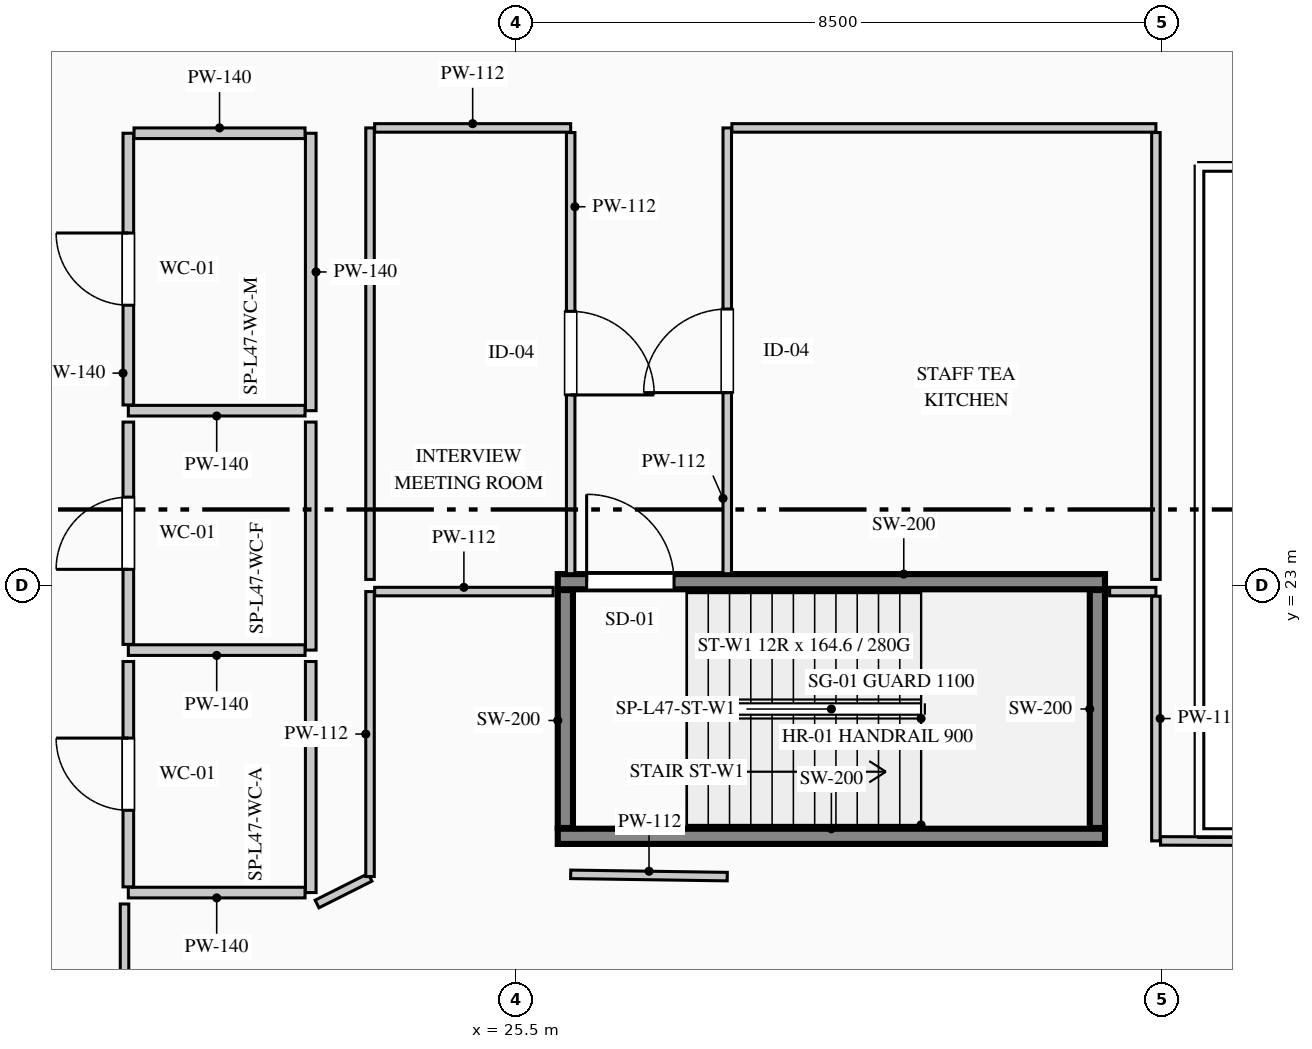
"""IFC4 building model, lengths in metres.
Left out: names, types, materials, properties, quantities, classifications, styles, units other than length and angle.
Written with IfcOpenShell. Run it as: python <this file> out.ifc"""

import sys

from ifc_helpers import new_model, si_unit, direction, frame, frame_2d, origin, place, context, subcontext, project, spatial, rectangle, extrude, element, fill, save


model = new_model("IFC4")
c1 = context("Model", 3, precision=1e-05, world=origin(), true_north=direction((0.0, 1.0)))
c2 = subcontext(c1, "Body", "Model", "MODEL_VIEW")
j1 = project(units=[si_unit("LENGTHUNIT", "METRE"), si_unit("PLANEANGLEUNIT", "RADIAN")], contexts=[c1])
p1 = place(None, origin())
s1 = spatial("IfcSite", under=j1, at=p1, CompositionType="ELEMENT")
p2 = place(p1, origin())
s2 = spatial("IfcBuilding", under=s1, at=p2, CompositionType="ELEMENT")
p3 = place(p2, frame((0.0, 0.0, 199.55)))
s3 = spatial("IfcBuildingStorey", under=s2, at=p3, CompositionType="ELEMENT", Elevation=199.55)
p4 = place(p3, frame((26.05, 19.7, 0.0), z_axis=(0.0, 0.0, 1.0), x_axis=(1.0, 0.0, 0.0)))
e1 = element("IfcWall", 1, at=p4, inside=s3, PredefinedType="SHEAR", context=c2, shape_type="SweptSolid", body=[
    extrude(rectangle(XDim=7.2, YDim=0.2, at=frame_2d((3.6, 0.0))), origin(), (0.0, 0.0, 1.0), 3.95),
])
p5 = place(p3, frame((26.05, 23.05, 0.0), z_axis=(0.0, 0.0, 1.0), x_axis=(1.0, 0.0, 0.0)))
e2 = element("IfcWall", 2, at=p5, inside=s3, PredefinedType="SHEAR", context=c2, shape_type="SweptSolid", body=[
    extrude(rectangle(XDim=7.2, YDim=0.2, at=frame_2d((3.6, 0.0))), origin(), (0.0, 0.0, 1.0), 3.95),
])
p6 = place(p5, frame((0.38, 0.0, 0.0)))
e3 = element("IfcOpeningElement", 3, at=p6, cuts=e2, PredefinedType="OPENING", context=c2, shape_type="SweptSolid", body=[
    extrude(rectangle(XDim=1.15, YDim=2.2, at=frame_2d((0.575, 1.1))), frame((0.0, 0.11, 0.0), z_axis=(0.0, -1.0, 0.0), x_axis=(1.0, 0.0, 0.0)), (0.0, 0.0, 1.0), 0.22),
])
for number, where, z_axis, x_axis in (
    (4, (26.15, 19.81, 0.0), (0.0, 0.0, 1.0), (0.0, 1.0, 0.0)),
    (5, (33.15, 19.81, 0.0), (0.0, 0.0, 1.0), (0.0, 1.0, 0.0)),
):
    element("IfcWall", number, at=place(p3, frame(where, z_axis=z_axis, x_axis=x_axis)), inside=s3, PredefinedType="SHEAR", context=c2, shape_type="SweptSolid", body=[
        extrude(rectangle(XDim=3.13, YDim=0.2, at=frame_2d((1.565, 0.0))), origin(), (0.0, 0.0, 1.0), 3.95),
    ])
p7 = place(p3, frame((22.8, 28.95, 0.0), z_axis=(0.0, 0.0, 1.0), x_axis=(0.0, -1.0, 0.0)))
e6 = element("IfcWall", 6, at=p7, inside=s3, PredefinedType="PARTITIONING", context=c2, shape_type="SweptSolid", body=[
    extrude(rectangle(XDim=3.65, YDim=0.14, at=frame_2d((1.825, 0.0))), origin(), (0.0, 0.0, 1.0), 3.285),
])
p8 = place(p3, frame((22.725, 25.3, 0.0), z_axis=(0.0, 0.0, 1.0), x_axis=(-1.0, 0.0, 0.0)))
e7 = element("IfcWall", 7, at=p8, inside=s3, PredefinedType="PARTITIONING", context=c2, shape_type="SweptSolid", body=[
    extrude(rectangle(XDim=2.325, YDim=0.14, at=frame_2d((1.163, 0.0))), origin(), (0.0, 0.0, 1.0), 3.7),
])
p9 = place(p3, frame((20.4, 25.375, 0.0), z_axis=(0.0, 0.0, 1.0), x_axis=(0.0, 1.0, 0.0)))
e8 = element("IfcWall", 8, at=p9, inside=s3, PredefinedType="PARTITIONING", context=c2, shape_type="SweptSolid", body=[
    extrude(rectangle(XDim=3.575, YDim=0.14, at=frame_2d((1.788, 0.0))), origin(), (0.0, 0.0, 1.0), 3.7),
])
p10 = place(p9, frame((1.312, 0.0, 0.0)))
e9 = element("IfcOpeningElement", 9, at=p10, cuts=e8, PredefinedType="OPENING", context=c2, shape_type="SweptSolid", body=[
    extrude(rectangle(XDim=0.95, YDim=2.15, at=frame_2d((0.475, 1.075))), frame((0.0, 0.08, 0.0), z_axis=(0.0, -1.0, 0.0), x_axis=(1.0, 0.0, 0.0)), (0.0, 0.0, 1.0), 0.16),
])
p11 = place(p3, frame((20.475, 28.95, 0.0), z_axis=(0.0, 0.0, 1.0), x_axis=(1.0, 0.0, 0.0)))
e10 = element("IfcWall", 10, at=p11, inside=s3, PredefinedType="PARTITIONING", context=c2, shape_type="SweptSolid", body=[
    extrude(rectangle(XDim=2.25, YDim=0.14, at=frame_2d((1.125, 0.0))), origin(), (0.0, 0.0, 1.0), 3.7),
])
p12 = place(p3, frame((22.8, 25.15, 0.0), z_axis=(0.0, 0.0, 1.0), x_axis=(0.0, -1.0, 0.0)))
e11 = element("IfcWall", 11, at=p12, inside=s3, PredefinedType="PARTITIONING", context=c2, shape_type="SweptSolid", body=[
    extrude(rectangle(XDim=3.0, YDim=0.14, at=frame_2d((1.5, 0.0))), origin(), (0.0, 0.0, 1.0), 3.285),
])
p13 = place(p3, frame((22.725, 22.15, 0.0), z_axis=(0.0, 0.0, 1.0), x_axis=(-1.0, 0.0, 0.0)))
e12 = element("IfcWall", 12, at=p13, inside=s3, PredefinedType="PARTITIONING", context=c2, shape_type="SweptSolid", body=[
    extrude(rectangle(XDim=2.325, YDim=0.14, at=frame_2d((1.163, 0.0))), origin(), (0.0, 0.0, 1.0), 3.7),
])
p14 = place(p3, frame((20.4, 22.225, 0.0), z_axis=(0.0, 0.0, 1.0), x_axis=(0.0, 1.0, 0.0)))
e13 = element("IfcWall", 13, at=p14, inside=s3, PredefinedType="PARTITIONING", context=c2, shape_type="SweptSolid", body=[
    extrude(rectangle(XDim=2.925, YDim=0.14, at=frame_2d((1.462, 0.0))), origin(), (0.0, 0.0, 1.0), 3.7),
])
p15 = place(p14, frame((0.988, 0.0, 0.0)))
e14 = element("IfcOpeningElement", 14, at=p15, cuts=e13, PredefinedType="OPENING", context=c2, shape_type="SweptSolid", body=[
    extrude(rectangle(XDim=0.95, YDim=2.15, at=frame_2d((0.475, 1.075))), frame((0.0, 0.08, 0.0), z_axis=(0.0, -1.0, 0.0), x_axis=(1.0, 0.0, 0.0)), (0.0, 0.0, 1.0), 0.16),
])
p16 = place(p3, frame((22.8, 22.0, 0.0), z_axis=(0.0, 0.0, 1.0), x_axis=(0.0, -1.0, 0.0)))
e15 = element("IfcWall", 15, at=p16, inside=s3, PredefinedType="PARTITIONING", context=c2, shape_type="SweptSolid", body=[
    extrude(rectangle(XDim=3.04, YDim=0.14, at=frame_2d((1.52, 0.0))), origin(), (0.0, 0.0, 1.0), 3.285),
])
p17 = place(p3, frame((22.725, 18.96, 0.0), z_axis=(0.0, 0.0, 1.0), x_axis=(-1.0, 0.0, 0.0)))
e16 = element("IfcWall", 16, at=p17, inside=s3, PredefinedType="PARTITIONING", context=c2, shape_type="SweptSolid", body=[
    extrude(rectangle(XDim=2.325, YDim=0.14, at=frame_2d((1.163, 0.0))), origin(), (0.0, 0.0, 1.0), 3.7),
])
p18 = place(p3, frame((20.4, 19.035, 0.0), z_axis=(0.0, 0.0, 1.0), x_axis=(0.0, 1.0, 0.0)))
e17 = element("IfcWall", 17, at=p18, inside=s3, PredefinedType="PARTITIONING", context=c2, shape_type="SweptSolid", body=[
    extrude(rectangle(XDim=2.965, YDim=0.14, at=frame_2d((1.482, 0.0))), origin(), (0.0, 0.0, 1.0), 3.7),
])
p19 = place(p18, frame((1.008, 0.0, 0.0)))
e18 = element("IfcOpeningElement", 18, at=p19, cuts=e17, PredefinedType="OPENING", context=c2, shape_type="SweptSolid", body=[
    extrude(rectangle(XDim=0.95, YDim=2.15, at=frame_2d((0.475, 1.075))), frame((0.0, 0.08, 0.0), z_axis=(0.0, -1.0, 0.0), x_axis=(1.0, 0.0, 0.0)), (0.0, 0.0, 1.0), 0.16),
])
p20 = place(p3, frame((33.311, 22.92, 0.0), z_axis=(0.0, 0.0, 1.0), x_axis=(1.0, 0.0, 0.0)))
e19 = element("IfcWall", 19, at=p20, inside=s3, PredefinedType="PARTITIONING", context=c2, shape_type="SweptSolid", body=[
    extrude(rectangle(XDim=0.609, YDim=0.112, at=frame_2d((0.305, 0.0))), origin(), (0.0, 0.0, 1.0), 3.7),
])
p21 = place(p3, frame((33.92, 22.859, 0.0), z_axis=(0.0, 0.0, 1.0), x_axis=(0.0, -1.0, 0.0)))
e20 = element("IfcWall", 20, at=p21, inside=s3, PredefinedType="PARTITIONING", context=c2, shape_type="SweptSolid", body=[
    extrude(rectangle(XDim=3.219, YDim=0.112, at=frame_2d((1.609, 0.0))), origin(), (0.0, 0.0, 1.0), 2.885),
])
p22 = place(p3, frame((33.981, 19.64, 0.0), z_axis=(0.0, 0.0, 1.0), x_axis=(0.999996388808, -0.002687447056, 0.0)))
e21 = element("IfcWall", 21, at=p22, inside=s3, PredefinedType="PARTITIONING", context=c2, shape_type="SweptSolid", body=[
    extrude(rectangle(XDim=9.175, YDim=0.112, at=frame_2d((4.588, 0.0))), origin(), (0.0, 0.0, 1.0), 3.7),
])
p23 = place(p3, frame((20.35, 12.8, 0.0), z_axis=(0.0, 0.0, 1.0), x_axis=(0.0, 1.0, 0.0)))
e22 = element("IfcWall", 22, at=p23, inside=s3, PredefinedType="PARTITIONING", context=c2, shape_type="SweptSolid", body=[
    extrude(rectangle(XDim=6.01, YDim=0.112, at=frame_2d((3.005, 0.0))), origin(), (0.0, 0.0, 1.0), 3.7),
])
p24 = place(p23, frame((2.455, 0.0, 0.0)))
e23 = element("IfcOpeningElement", 23, at=p24, cuts=e22, PredefinedType="OPENING", context=c2, shape_type="SweptSolid", body=[
    extrude(rectangle(XDim=1.1, YDim=2.2, at=frame_2d((0.55, 1.1))), frame((0.0, 0.066, 0.0), z_axis=(0.0, -1.0, 0.0), x_axis=(1.0, 0.0, 0.0)), (0.0, 0.0, 1.0), 0.132),
])
p25 = place(p3, frame((22.883, 18.81, 0.0), z_axis=(0.0, 0.0, 1.0), x_axis=(0.893737436086, 0.448590453909, 0.0)))
e24 = element("IfcWall", 24, at=p25, inside=s3, PredefinedType="PARTITIONING", context=c2, shape_type="SweptSolid", body=[
    extrude(rectangle(XDim=0.78, YDim=0.112, at=frame_2d((0.39, 0.0))), origin(), (0.0, 0.0, 1.0), 3.7),
])
p26 = place(p3, frame((23.58, 19.171, 0.0), z_axis=(0.0, 0.0, 1.0), x_axis=(0.0, 1.0, 0.0)))
e25 = element("IfcWall", 25, at=p26, inside=s3, PredefinedType="PARTITIONING", context=c2, shape_type="SweptSolid", body=[
    extrude(rectangle(XDim=3.749, YDim=0.112, at=frame_2d((1.875, 0.0))), origin(), (0.0, 0.0, 1.0), 3.7),
])
p27 = place(p3, frame((23.641, 22.92, 0.0), z_axis=(0.0, 0.0, 1.0), x_axis=(1.0, 0.0, 0.0)))
e26 = element("IfcWall", 26, at=p27, inside=s3, PredefinedType="PARTITIONING", context=c2, shape_type="SweptSolid", body=[
    extrude(rectangle(XDim=2.348, YDim=0.112, at=frame_2d((1.174, 0.0))), origin(), (0.0, 0.0, 1.0), 3.7),
])
p28 = place(p3, frame((26.22, 19.2, 0.0), z_axis=(0.0, 0.0, 1.0), x_axis=(0.999893773718, -0.014575365509, 0.0)))
e27 = element("IfcWall", 27, at=p28, inside=s3, PredefinedType="PARTITIONING", context=c2, shape_type="SweptSolid", body=[
    extrude(rectangle(XDim=2.06, YDim=0.112, at=frame_2d((1.03, 0.0))), origin(), (0.0, 0.0, 1.0), 3.7),
])
p29 = place(p3, frame((23.58, 23.08, 0.0), z_axis=(0.0, 0.0, 1.0), x_axis=(0.0, 1.0, 0.0)))
e28 = element("IfcWall", 28, at=p29, inside=s3, PredefinedType="PARTITIONING", context=c2, shape_type="SweptSolid", body=[
    extrude(rectangle(XDim=5.94, YDim=0.112, at=frame_2d((2.97, 0.0))), origin(), (0.0, 0.0, 1.0), 3.7),
])
p30 = place(p3, frame((23.641, 29.02, 0.0), z_axis=(0.0, 0.0, 1.0), x_axis=(1.0, 0.0, 0.0)))
e29 = element("IfcWall", 29, at=p30, inside=s3, PredefinedType="PARTITIONING", context=c2, shape_type="SweptSolid", body=[
    extrude(rectangle(XDim=2.579, YDim=0.112, at=frame_2d((1.29, 0.0))), origin(), (0.0, 0.0, 1.0), 3.485),
])
p31 = place(p3, frame((26.22, 28.959, 0.0), z_axis=(0.0, 0.0, 1.0), x_axis=(0.0, -1.0, 0.0)))
e30 = element("IfcWall", 30, at=p31, inside=s3, PredefinedType="PARTITIONING", context=c2, shape_type="SweptSolid", body=[
    extrude(rectangle(XDim=5.804, YDim=0.112, at=frame_2d((2.902, 0.0))), origin(), (0.0, 0.0, 1.0), 3.7),
])
p32 = place(p31, frame((2.352, 0.0, 0.0)))
e31 = element("IfcOpeningElement", 31, at=p32, cuts=e30, PredefinedType="OPENING", context=c2, shape_type="SweptSolid", body=[
    extrude(rectangle(XDim=1.1, YDim=2.2, at=frame_2d((0.55, 1.1))), frame((0.0, 0.066, 0.0), z_axis=(0.0, -1.0, 0.0), x_axis=(1.0, 0.0, 0.0)), (0.0, 0.0, 1.0), 0.132),
])
p33 = place(p3, frame((28.28, 23.155, 0.0), z_axis=(0.0, 0.0, 1.0), x_axis=(0.0, 1.0, 0.0)))
e32 = element("IfcWall", 32, at=p33, inside=s3, PredefinedType="PARTITIONING", context=c2, shape_type="SweptSolid", body=[
    extrude(rectangle(XDim=5.865, YDim=0.112, at=frame_2d((2.933, 0.0))), origin(), (0.0, 0.0, 1.0), 3.7),
])
p34 = place(p33, frame((2.383, 0.0, 0.0)))
e33 = element("IfcOpeningElement", 33, at=p34, cuts=e32, PredefinedType="OPENING", context=c2, shape_type="SweptSolid", body=[
    extrude(rectangle(XDim=1.1, YDim=2.2, at=frame_2d((0.55, 1.1))), frame((0.0, 0.066, 0.0), z_axis=(0.0, -1.0, 0.0), x_axis=(1.0, 0.0, 0.0)), (0.0, 0.0, 1.0), 0.132),
])
p35 = place(p3, frame((28.341, 29.02, 0.0), z_axis=(0.0, 0.0, 1.0), x_axis=(1.0, 0.0, 0.0)))
e34 = element("IfcWall", 34, at=p35, inside=s3, PredefinedType="PARTITIONING", context=c2, shape_type="SweptSolid", body=[
    extrude(rectangle(XDim=5.579, YDim=0.112, at=frame_2d((2.79, 0.0))), origin(), (0.0, 0.0, 1.0), 3.485),
])
p36 = place(p3, frame((33.92, 28.959, 0.0), z_axis=(0.0, 0.0, 1.0), x_axis=(0.0, -1.0, 0.0)))
e35 = element("IfcWall", 35, at=p36, inside=s3, PredefinedType="PARTITIONING", context=c2, shape_type="SweptSolid", body=[
    extrude(rectangle(XDim=5.879, YDim=0.112, at=frame_2d((2.939, 0.0))), origin(), (0.0, 0.0, 1.0), 2.885),
])
p37 = place(p6, origin())
e36 = element("IfcDoor", 36, at=p37, inside=s3, OperationType="SINGLE_SWING_LEFT", PredefinedType="DOOR", context=c2, shape_type="SweptSolid", body=[
    extrude(rectangle(XDim=1.15, YDim=2.2, at=frame_2d((0.575, 1.1))), frame((0.0, 0.025, 0.0), z_axis=(0.0, -1.0, 0.0), x_axis=(1.0, 0.0, 0.0)), (0.0, 0.0, 1.0), 0.05),
])
fill(e3, e36)
p38 = place(p10, origin())
e37 = element("IfcDoor", 37, at=p38, inside=s3, OperationType="SINGLE_SWING_RIGHT", PredefinedType="DOOR", context=c2, shape_type="SweptSolid", body=[
    extrude(rectangle(XDim=0.95, YDim=2.15, at=frame_2d((0.475, 1.075))), frame((0.0, 0.025, 0.0), z_axis=(0.0, -1.0, 0.0), x_axis=(1.0, 0.0, 0.0)), (0.0, 0.0, 1.0), 0.05),
])
fill(e9, e37)
p39 = place(p15, origin())
e38 = element("IfcDoor", 38, at=p39, inside=s3, OperationType="SINGLE_SWING_LEFT", PredefinedType="DOOR", context=c2, shape_type="SweptSolid", body=[
    extrude(rectangle(XDim=0.95, YDim=2.15, at=frame_2d((0.475, 1.075))), frame((0.0, 0.025, 0.0), z_axis=(0.0, -1.0, 0.0), x_axis=(1.0, 0.0, 0.0)), (0.0, 0.0, 1.0), 0.05),
])
fill(e14, e38)
p40 = place(p19, origin())
e39 = element("IfcDoor", 39, at=p40, inside=s3, OperationType="SINGLE_SWING_RIGHT", PredefinedType="DOOR", context=c2, shape_type="SweptSolid", body=[
    extrude(rectangle(XDim=0.95, YDim=2.15, at=frame_2d((0.475, 1.075))), frame((0.0, 0.025, 0.0), z_axis=(0.0, -1.0, 0.0), x_axis=(1.0, 0.0, 0.0)), (0.0, 0.0, 1.0), 0.05),
])
fill(e18, e39)
p41 = place(p32, origin())
e40 = element("IfcDoor", 40, at=p41, inside=s3, OperationType="SINGLE_SWING_RIGHT", PredefinedType="DOOR", context=c2, shape_type="SweptSolid", body=[
    extrude(rectangle(XDim=1.1, YDim=2.2, at=frame_2d((0.55, 1.1))), frame((0.0, 0.025, 0.0), z_axis=(0.0, -1.0, 0.0), x_axis=(1.0, 0.0, 0.0)), (0.0, 0.0, 1.0), 0.05),
])
fill(e31, e40)
p42 = place(p34, origin())
e41 = element("IfcDoor", 41, at=p42, inside=s3, OperationType="SINGLE_SWING_LEFT", PredefinedType="DOOR", context=c2, shape_type="SweptSolid", body=[
    extrude(rectangle(XDim=1.1, YDim=2.2, at=frame_2d((0.55, 1.1))), frame((0.0, 0.025, 0.0), z_axis=(0.0, -1.0, 0.0), x_axis=(1.0, 0.0, 0.0)), (0.0, 0.0, 1.0), 0.05),
])
fill(e33, e41)
save(model, sys.argv[1])
